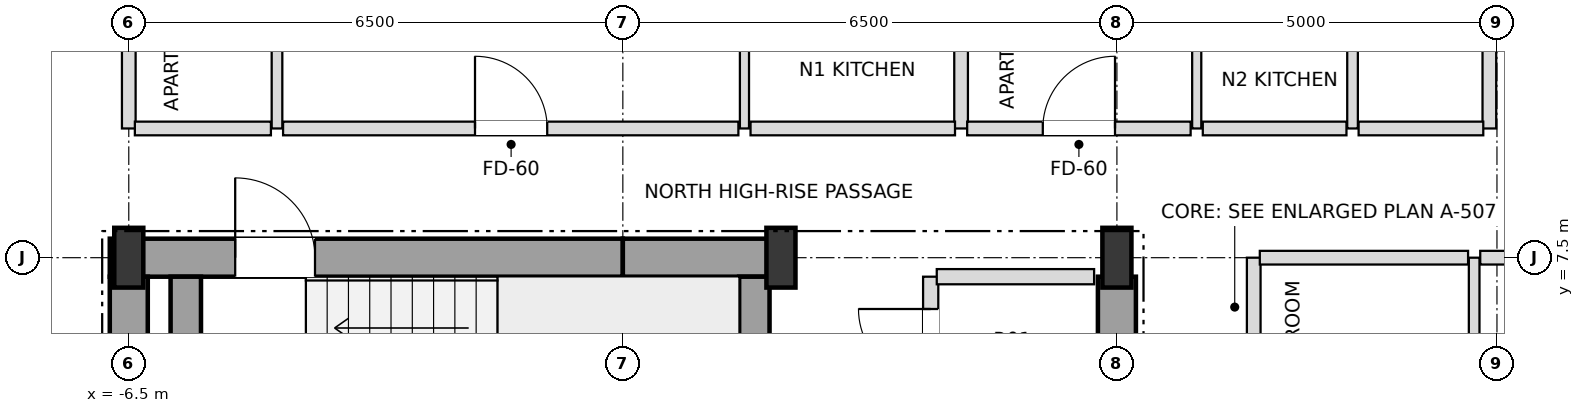
"""IFC4 building model, lengths in metres.
Left out: names, types, materials, properties, quantities, classifications, styles, units other than length and angle.
Written with IfcOpenShell. Run it as: python <this file> out.ifc"""

import sys

from ifc_helpers import new_model, si_unit, direction, frame, frame_2d, origin, origin_2d, place, context, subcontext, project, spatial, rectangle, i_section, extrude, element, fill, save


model = new_model("IFC4")
c1 = context("Model", 3, precision=1e-05, world=origin(), true_north=direction((0.0, 1.0)))
c2 = subcontext(c1, "Body", "Model", "MODEL_VIEW")
j1 = project(units=[si_unit("LENGTHUNIT", "METRE"), si_unit("PLANEANGLEUNIT", "RADIAN")], contexts=[c1])
p1 = place(None, origin())
s1 = spatial("IfcSite", under=j1, at=p1, CompositionType="ELEMENT")
p2 = place(p1, origin())
s2 = spatial("IfcBuilding", under=s1, at=p2, CompositionType="ELEMENT")
p3 = place(p2, frame((0.0, 0.0, 251.1)))
s3 = spatial("IfcBuildingStorey", under=s2, at=p3, CompositionType="ELEMENT", Elevation=251.1)
for number, where, z_axis, x_axis in (
    (1, (-6.5, 7.5, 0.0), (0.0, 0.0, 1.0), (1.0, 0.0, 0.0)),
    (2, (2.08, 7.5, 0.0), (0.0, 0.0, 1.0), (1.0, 0.0, 0.0)),
    (3, (6.5, 7.5, 0.0), (0.0, 0.0, 1.0), (1.0, 0.0, 0.0)),
):
    element("IfcColumn", number, at=place(p3, frame(where, z_axis=z_axis, x_axis=x_axis)), inside=s3, PredefinedType="COLUMN", context=c2, shape_type="SweptSolid", body=[
        extrude(i_section(OverallWidth=0.382, OverallDepth=0.786, WebThickness=0.02, FlangeThickness=0.033, at=origin_2d()), origin(), (0.0, 0.0, 1.0), 3.6),
    ])
p4 = place(p3, frame((-6.75, 7.5, 0.0), z_axis=(0.0, 0.0, 1.0), x_axis=(1.0, 0.0, 0.0)))
e4 = element("IfcWall", 4, at=p4, inside=s3, PredefinedType="SHEAR", context=c2, shape_type="SweptSolid", body=[
    extrude(rectangle(XDim=6.75, YDim=0.5, at=frame_2d((3.375, 0.0))), origin(), (0.0, 0.0, 1.0), 3.38),
])
p5 = place(p4, frame((1.65, 0.0, 0.0)))
e5 = element("IfcOpeningElement", 5, at=p5, cuts=e4, PredefinedType="OPENING", context=c2, shape_type="SweptSolid", body=[
    extrude(rectangle(XDim=1.05, YDim=2.15, at=frame_2d((0.525, 1.075))), frame((0.0, 0.26, 0.0), z_axis=(0.0, -1.0, 0.0), x_axis=(1.0, 0.0, 0.0)), (0.0, 0.0, 1.0), 0.52),
])
p6 = place(p3, frame((0.0, 7.5, 0.0), z_axis=(0.0, 0.0, 1.0), x_axis=(1.0, 0.0, 0.0)))
e6 = element("IfcWall", 6, at=p6, inside=s3, PredefinedType="SHEAR", context=c2, shape_type="SweptSolid", body=[
    extrude(rectangle(XDim=2.08, YDim=0.5, at=frame_2d((1.04, 0.0))), origin(), (0.0, 0.0, 1.0), 3.38),
])
for number, where, z_axis, x_axis in (
    (7, (-6.5, 3.95, 0.0), (0.0, 0.0, 1.0), (0.0, 1.0, 0.0)),
    (8, (6.5, 3.95, 0.0), (0.0, 0.0, 1.0), (0.0, 1.0, 0.0)),
):
    element("IfcWall", number, at=place(p3, frame(where, z_axis=z_axis, x_axis=x_axis)), inside=s3, PredefinedType="SHEAR", context=c2, shape_type="SweptSolid", body=[
        extrude(rectangle(XDim=3.3, YDim=0.5, at=frame_2d((1.65, 0.0))), origin(), (0.0, 0.0, 1.0), 3.38),
    ])
for number, where, z_axis, x_axis in (
    (9, (1.73, 3.95, 0.0), (0.0, 0.0, 1.0), (0.0, 1.0, 0.0)),
    (10, (-5.75, 3.95, 0.0), (0.0, 0.0, 1.0), (0.0, 1.0, 0.0)),
):
    element("IfcWall", number, at=place(p3, frame(where, z_axis=z_axis, x_axis=x_axis)), inside=s3, PredefinedType="SHEAR", context=c2, shape_type="SweptSolid", body=[
        extrude(rectangle(XDim=3.3, YDim=0.4, at=frame_2d((1.65, 0.0))), origin(), (0.0, 0.0, 1.0), 3.38),
    ])
p7 = place(p3, frame((-6.5, 9.2, 0.0), z_axis=(0.0, 0.0, 1.0), x_axis=(0.0, 1.0, 0.0)))
e11 = element("IfcWall", 11, at=p7, inside=s3, PredefinedType="PARTITIONING", context=c2, shape_type="SweptSolid", body=[
    extrude(rectangle(XDim=10.7, YDim=0.18, at=frame_2d((5.35, 0.0))), origin(), (0.0, 0.0, 1.0), 2.826),
])
p8 = place(p3, frame((-4.55, 9.2, 0.0), z_axis=(0.0, 0.0, 1.0), x_axis=(0.0, 1.0, 0.0)))
e12 = element("IfcWall", 12, at=p8, inside=s3, PredefinedType="PARTITIONING", context=c2, shape_type="SweptSolid", body=[
    extrude(rectangle(XDim=4.7, YDim=0.14, at=frame_2d((2.35, 0.0))), origin(), (0.0, 0.0, 1.0), 3.38),
])
p9 = place(p8, frame((1.9, 0.0, 0.0)))
e13 = element("IfcOpeningElement", 13, at=p9, cuts=e12, PredefinedType="OPENING", context=c2, shape_type="SweptSolid", body=[
    extrude(rectangle(XDim=0.9, YDim=2.1, at=frame_2d((0.45, 1.05))), frame((0.0, 0.08, 0.0), z_axis=(0.0, -1.0, 0.0), x_axis=(1.0, 0.0, 0.0)), (0.0, 0.0, 1.0), 0.16),
])
p10 = place(p3, frame((1.6, 9.2, 0.0), z_axis=(0.0, 0.0, 1.0), x_axis=(0.0, 1.0, 0.0)))
e14 = element("IfcWall", 14, at=p10, inside=s3, PredefinedType="PARTITIONING", context=c2, shape_type="SweptSolid", body=[
    extrude(rectangle(XDim=10.7, YDim=0.12, at=frame_2d((5.35, 0.0))), origin(), (0.0, 0.0, 1.0), 3.018),
])
p11 = place(p10, frame((1.875, 0.0, 0.0)))
e15 = element("IfcOpeningElement", 15, at=p11, cuts=e14, PredefinedType="OPENING", context=c2, shape_type="SweptSolid", body=[
    extrude(rectangle(XDim=0.95, YDim=2.1, at=frame_2d((0.475, 1.05))), frame((0.0, 0.07, 0.0), z_axis=(0.0, -1.0, 0.0), x_axis=(1.0, 0.0, 0.0)), (0.0, 0.0, 1.0), 0.14),
])
p12 = place(p10, frame((7.25, 0.0, 0.0)))
e16 = element("IfcOpeningElement", 16, at=p12, cuts=e14, PredefinedType="OPENING", context=c2, shape_type="SweptSolid", body=[
    extrude(rectangle(XDim=0.9, YDim=2.1, at=frame_2d((0.45, 1.05))), frame((0.0, 0.07, 0.0), z_axis=(0.0, -1.0, 0.0), x_axis=(1.0, 0.0, 0.0)), (0.0, 0.0, 1.0), 0.14),
])
p13 = place(p3, frame((4.05, 5.55, 0.0), z_axis=(0.0, 0.0, 1.0), x_axis=(0.0, 1.0, 0.0)))
e17 = element("IfcWall", 17, at=p13, inside=s3, PredefinedType="SOLIDWALL", context=c2, shape_type="SweptSolid", body=[
    extrude(rectangle(XDim=1.7, YDim=0.2, at=frame_2d((0.85, 0.0))), origin(), (0.0, 0.0, 1.0), 3.38),
])
p14 = place(p13, frame((0.325, 0.0, 0.0)))
e18 = element("IfcOpeningElement", 18, at=p14, cuts=e17, PredefinedType="OPENING", context=c2, shape_type="SweptSolid", body=[
    extrude(rectangle(XDim=0.95, YDim=2.15, at=frame_2d((0.475, 1.075))), frame((0.0, 0.11, 0.0), z_axis=(0.0, -1.0, 0.0), x_axis=(1.0, 0.0, 0.0)), (0.0, 0.0, 1.0), 0.22),
])
p15 = place(p3, frame((4.45, 9.2, 0.0), z_axis=(0.0, 0.0, 1.0), x_axis=(0.0, 1.0, 0.0)))
e19 = element("IfcWall", 19, at=p15, inside=s3, PredefinedType="PARTITIONING", context=c2, shape_type="SweptSolid", body=[
    extrude(rectangle(XDim=10.7, YDim=0.18, at=frame_2d((5.35, 0.0))), origin(), (0.0, 0.0, 1.0), 3.018),
])
p16 = place(p3, frame((7.55, 9.2, 0.0), z_axis=(0.0, 0.0, 1.0), x_axis=(0.0, 1.0, 0.0)))
e20 = element("IfcWall", 20, at=p16, inside=s3, PredefinedType="PARTITIONING", context=c2, shape_type="SweptSolid", body=[
    extrude(rectangle(XDim=4.7, YDim=0.12, at=frame_2d((2.35, 0.0))), origin(), (0.0, 0.0, 1.0), 2.826),
])
p17 = place(p16, frame((1.875, 0.0, 0.0)))
e21 = element("IfcOpeningElement", 21, at=p17, cuts=e20, PredefinedType="OPENING", context=c2, shape_type="SweptSolid", body=[
    extrude(rectangle(XDim=0.95, YDim=2.1, at=frame_2d((0.475, 1.05))), frame((0.0, 0.07, 0.0), z_axis=(0.0, -1.0, 0.0), x_axis=(1.0, 0.0, 0.0)), (0.0, 0.0, 1.0), 0.14),
])
p18 = place(p3, frame((8.3, -7.5, 0.0), z_axis=(0.0, 0.0, 1.0), x_axis=(0.0, 1.0, 0.0)))
e22 = element("IfcWall", 22, at=p18, inside=s3, PredefinedType="PARTITIONING", context=c2, shape_type="SweptSolid", body=[
    extrude(rectangle(XDim=15.0, YDim=0.18, at=frame_2d((7.5, 0.0))), origin(), (0.0, 0.0, 1.0), 3.38),
])
p19 = place(p18, frame((2.355, 0.0, 0.0)))
e23 = element("IfcOpeningElement", 23, at=p19, cuts=e22, PredefinedType="OPENING", context=c2, shape_type="SweptSolid", body=[
    extrude(rectangle(XDim=0.95, YDim=2.15, at=frame_2d((0.475, 1.075))), frame((0.0, 0.1, 0.0), z_axis=(0.0, -1.0, 0.0), x_axis=(1.0, 0.0, 0.0)), (0.0, 0.0, 1.0), 0.2),
])
p20 = place(p3, frame((9.6, 9.2, 0.0), z_axis=(0.0, 0.0, 1.0), x_axis=(0.0, 1.0, 0.0)))
e24 = element("IfcWall", 24, at=p20, inside=s3, PredefinedType="PARTITIONING", context=c2, shape_type="SweptSolid", body=[
    extrude(rectangle(XDim=4.7, YDim=0.14, at=frame_2d((2.35, 0.0))), origin(), (0.0, 0.0, 1.0), 2.826),
])
p21 = place(p20, frame((1.9, 0.0, 0.0)))
e25 = element("IfcOpeningElement", 25, at=p21, cuts=e24, PredefinedType="OPENING", context=c2, shape_type="SweptSolid", body=[
    extrude(rectangle(XDim=0.9, YDim=2.1, at=frame_2d((0.45, 1.05))), frame((0.0, 0.08, 0.0), z_axis=(0.0, -1.0, 0.0), x_axis=(1.0, 0.0, 0.0)), (0.0, 0.0, 1.0), 0.16),
])
p22 = place(p3, frame((11.2, -7.5, 0.0), z_axis=(0.0, 0.0, 1.0), x_axis=(0.0, 1.0, 0.0)))
e26 = element("IfcWall", 26, at=p22, inside=s3, PredefinedType="PARTITIONING", context=c2, shape_type="SweptSolid", body=[
    extrude(rectangle(XDim=15.0, YDim=0.14, at=frame_2d((7.5, 0.0))), origin(), (0.0, 0.0, 1.0), 3.38),
])
p23 = place(p22, frame((3.475, 0.0, 0.0)))
e27 = element("IfcOpeningElement", 27, at=p23, cuts=e26, PredefinedType="OPENING", context=c2, shape_type="SweptSolid", body=[
    extrude(rectangle(XDim=0.95, YDim=2.1, at=frame_2d((0.475, 1.05))), frame((0.0, 0.08, 0.0), z_axis=(0.0, -1.0, 0.0), x_axis=(1.0, 0.0, 0.0)), (0.0, 0.0, 1.0), 0.16),
])
p24 = place(p3, frame((11.4, 9.2, 0.0), z_axis=(0.0, 0.0, 1.0), x_axis=(0.0, 1.0, 0.0)))
e28 = element("IfcWall", 28, at=p24, inside=s3, PredefinedType="PARTITIONING", context=c2, shape_type="SweptSolid", body=[
    extrude(rectangle(XDim=5.07, YDim=0.18, at=frame_2d((2.535, 0.0))), origin(), (0.0, 0.0, 1.0), 2.748),
])
p25 = place(p3, frame((4.13, 7.25, 0.0), z_axis=(0.0, 0.0, 1.0), x_axis=(1.0, 0.0, 0.0)))
e29 = element("IfcWall", 29, at=p25, inside=s3, PredefinedType="SOLIDWALL", context=c2, shape_type="SweptSolid", body=[
    extrude(rectangle(XDim=2.07, YDim=0.2, at=frame_2d((1.035, 0.0))), origin(), (0.0, 0.0, 1.0), 3.38),
])
p26 = place(p3, frame((8.38, 7.5, 0.0), z_axis=(0.0, 0.0, 1.0), x_axis=(1.0, 0.0, 0.0)))
e30 = element("IfcWall", 30, at=p26, inside=s3, PredefinedType="PARTITIONING", context=c2, shape_type="SweptSolid", body=[
    extrude(rectangle(XDim=2.74, YDim=0.18, at=frame_2d((1.37, 0.0))), origin(), (0.0, 0.0, 1.0), 2.826),
])
p27 = place(p3, frame((11.28, 7.5, 0.0), z_axis=(0.0, 0.0, 1.0), x_axis=(1.0, 0.0, 0.0)))
e31 = element("IfcWall", 31, at=p27, inside=s3, PredefinedType="PARTITIONING", context=c2, shape_type="SweptSolid", body=[
    extrude(rectangle(XDim=5.62, YDim=0.18, at=frame_2d((2.81, 0.0))), origin(), (0.0, 0.0, 1.0), 2.826),
])
p28 = place(p3, frame((-6.42, 9.2, 0.0), z_axis=(0.0, 0.0, 1.0), x_axis=(1.0, 0.0, 0.0)))
e32 = element("IfcWall", 32, at=p28, inside=s3, PredefinedType="PARTITIONING", context=c2, shape_type="SweptSolid", body=[
    extrude(rectangle(XDim=1.79, YDim=0.18, at=frame_2d((0.895, 0.0))), origin(), (0.0, 0.0, 1.0), 3.38),
])
p29 = place(p3, frame((-4.47, 9.2, 0.0), z_axis=(0.0, 0.0, 1.0), x_axis=(1.0, 0.0, 0.0)))
e33 = element("IfcWall", 33, at=p29, inside=s3, PredefinedType="PARTITIONING", context=c2, shape_type="SweptSolid", body=[
    extrude(rectangle(XDim=5.99, YDim=0.18, at=frame_2d((2.995, 0.0))), origin(), (0.0, 0.0, 1.0), 3.38),
])
p30 = place(p29, frame((2.525, 0.0, 0.0)))
e34 = element("IfcOpeningElement", 34, at=p30, cuts=e33, PredefinedType="OPENING", context=c2, shape_type="SweptSolid", body=[
    extrude(rectangle(XDim=0.95, YDim=2.15, at=frame_2d((0.475, 1.075))), frame((0.0, 0.1, 0.0), z_axis=(0.0, -1.0, 0.0), x_axis=(1.0, 0.0, 0.0)), (0.0, 0.0, 1.0), 0.2),
])
p31 = place(p3, frame((1.68, 9.2, 0.0), z_axis=(0.0, 0.0, 1.0), x_axis=(1.0, 0.0, 0.0)))
e35 = element("IfcWall", 35, at=p31, inside=s3, PredefinedType="PARTITIONING", context=c2, shape_type="SweptSolid", body=[
    extrude(rectangle(XDim=2.69, YDim=0.18, at=frame_2d((1.345, 0.0))), origin(), (0.0, 0.0, 1.0), 3.38),
])
p32 = place(p3, frame((4.53, 9.2, 0.0), z_axis=(0.0, 0.0, 1.0), x_axis=(1.0, 0.0, 0.0)))
e36 = element("IfcWall", 36, at=p32, inside=s3, PredefinedType="PARTITIONING", context=c2, shape_type="SweptSolid", body=[
    extrude(rectangle(XDim=2.94, YDim=0.18, at=frame_2d((1.47, 0.0))), origin(), (0.0, 0.0, 1.0), 2.826),
])
p33 = place(p32, frame((0.995, 0.0, 0.0)))
e37 = element("IfcOpeningElement", 37, at=p33, cuts=e36, PredefinedType="OPENING", context=c2, shape_type="SweptSolid", body=[
    extrude(rectangle(XDim=0.95, YDim=2.15, at=frame_2d((0.475, 1.075))), frame((0.0, 0.1, 0.0), z_axis=(0.0, -1.0, 0.0), x_axis=(1.0, 0.0, 0.0)), (0.0, 0.0, 1.0), 0.2),
])
p34 = place(p3, frame((7.63, 9.2, 0.0), z_axis=(0.0, 0.0, 1.0), x_axis=(1.0, 0.0, 0.0)))
e38 = element("IfcWall", 38, at=p34, inside=s3, PredefinedType="PARTITIONING", context=c2, shape_type="SweptSolid", body=[
    extrude(rectangle(XDim=1.89, YDim=0.18, at=frame_2d((0.945, 0.0))), origin(), (0.0, 0.0, 1.0), 3.38),
])
p35 = place(p3, frame((9.68, 9.2, 0.0), z_axis=(0.0, 0.0, 1.0), x_axis=(1.0, 0.0, 0.0)))
e39 = element("IfcWall", 39, at=p35, inside=s3, PredefinedType="PARTITIONING", context=c2, shape_type="SweptSolid", body=[
    extrude(rectangle(XDim=1.64, YDim=0.18, at=frame_2d((0.82, 0.0))), origin(), (0.0, 0.0, 1.0), 3.38),
])
p36 = place(p5, origin())
e40 = element("IfcDoor", 40, at=p36, inside=s3, OperationType="SINGLE_SWING_LEFT", PredefinedType="DOOR", context=c2, shape_type="SweptSolid", body=[
    extrude(rectangle(XDim=1.05, YDim=2.15, at=frame_2d((0.525, 1.075))), frame((0.0, 0.025, 0.0), z_axis=(0.0, -1.0, 0.0), x_axis=(1.0, 0.0, 0.0)), (0.0, 0.0, 1.0), 0.05),
])
fill(e5, e40)
p37 = place(p14, origin())
e41 = element("IfcDoor", 41, at=p37, inside=s3, OperationType="SINGLE_SWING_RIGHT", PredefinedType="DOOR", context=c2, shape_type="SweptSolid", body=[
    extrude(rectangle(XDim=0.95, YDim=2.15, at=frame_2d((0.475, 1.075))), frame((0.0, 0.025, 0.0), z_axis=(0.0, -1.0, 0.0), x_axis=(1.0, 0.0, 0.0)), (0.0, 0.0, 1.0), 0.05),
])
fill(e18, e41)
p38 = place(p30, origin())
e42 = element("IfcDoor", 42, at=p38, inside=s3, OperationType="SINGLE_SWING_LEFT", PredefinedType="DOOR", context=c2, shape_type="SweptSolid", body=[
    extrude(rectangle(XDim=0.95, YDim=2.15, at=frame_2d((0.475, 1.075))), frame((0.0, 0.025, 0.0), z_axis=(0.0, -1.0, 0.0), x_axis=(1.0, 0.0, 0.0)), (0.0, 0.0, 1.0), 0.05),
])
fill(e34, e42)
p39 = place(p33, origin())
e43 = element("IfcDoor", 43, at=p39, inside=s3, OperationType="SINGLE_SWING_RIGHT", PredefinedType="DOOR", context=c2, shape_type="SweptSolid", body=[
    extrude(rectangle(XDim=0.95, YDim=2.15, at=frame_2d((0.475, 1.075))), frame((0.0, 0.025, 0.0), z_axis=(0.0, -1.0, 0.0), x_axis=(1.0, 0.0, 0.0)), (0.0, 0.0, 1.0), 0.05),
])
fill(e37, e43)
save(model, sys.argv[1])
